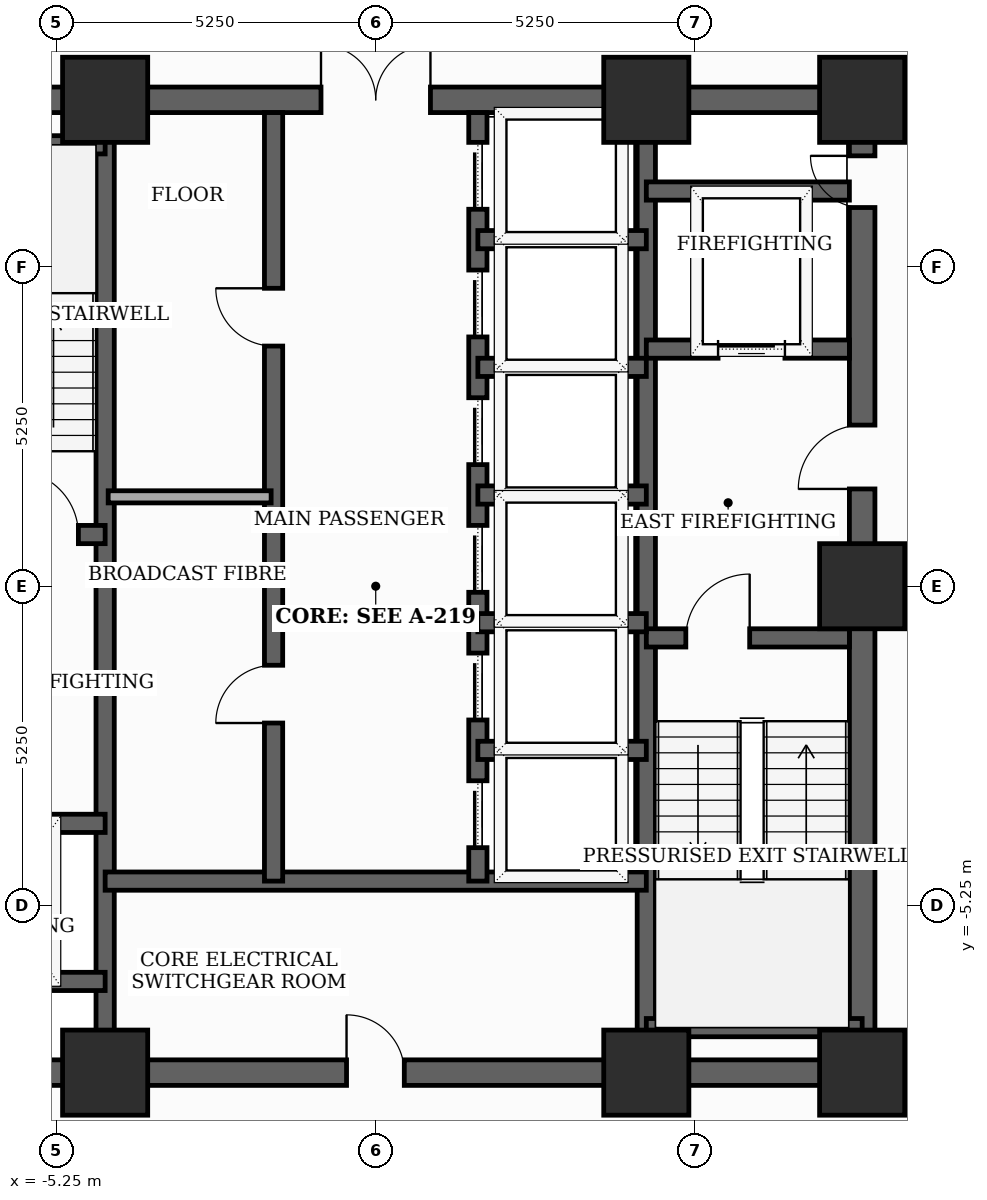
"""IFC4 building model, lengths in metres.
Left out: names, types, materials, properties, quantities, classifications, styles, units other than length and angle.
Written with IfcOpenShell. Run it as: python <this file> out.ifc"""

import sys

from ifc_helpers import new_model, si_unit, direction, frame, frame_2d, origin, origin_2d, place, context, subcontext, project, spatial, rectangle, extrude, element, fill, save


model = new_model("IFC4")
c1 = context("Model", 3, precision=1e-05, world=origin(), true_north=direction((0.0, 1.0)))
c2 = subcontext(c1, "Body", "Model", "MODEL_VIEW")
j1 = project(units=[si_unit("LENGTHUNIT", "METRE"), si_unit("PLANEANGLEUNIT", "RADIAN")], contexts=[c1])
p1 = place(None, origin())
s1 = spatial("IfcSite", under=j1, at=p1, CompositionType="ELEMENT")
p2 = place(p1, origin())
s2 = spatial("IfcBuilding", under=s1, at=p2, CompositionType="ELEMENT")
p3 = place(p2, frame((0.0, 0.0, 158.3)))
s3 = spatial("IfcBuildingStorey", under=s2, at=p3, CompositionType="ELEMENT", Elevation=158.3)
for number, where, z_axis, x_axis in (
    (1, (-4.45, -8.0, 0.0), (0.0, 0.0, 1.0), (1.0, 0.0, 0.0)),
    (2, (4.45, -8.0, 0.0), (0.0, 0.0, 1.0), (1.0, 0.0, 0.0)),
    (3, (8.0, -8.0, 0.0), (0.0, 0.0, 1.0), (1.0, 0.0, 0.0)),
    (4, (8.0, 0.0, 0.0), (0.0, 0.0, 1.0), (1.0, 0.0, 0.0)),
    (5, (8.0, 8.0, 0.0), (0.0, 0.0, 1.0), (1.0, 0.0, 0.0)),
    (6, (4.45, 8.0, 0.0), (0.0, 0.0, 1.0), (1.0, 0.0, 0.0)),
    (7, (-4.45, 8.0, 0.0), (0.0, 0.0, 1.0), (1.0, 0.0, 0.0)),
):
    element("IfcColumn", number, at=place(p3, frame(where, z_axis=z_axis, x_axis=x_axis)), inside=s3, PredefinedType="COLUMN", context=c2, shape_type="SweptSolid", body=[
        extrude(rectangle(XDim=1.4, YDim=1.4, at=origin_2d()), origin(), (0.0, 0.0, 1.0), 3.7),
    ])
p4 = place(p3, frame((6.493, -14.041, 0.0), z_axis=(0.0, 0.0, 1.0), x_axis=(0.80901166244, 0.587792591002, 0.0)))
e8 = element("IfcWall", 8, at=p4, inside=s3, PredefinedType="SOLIDWALL", context=c2, shape_type="SweptSolid", body=[
    extrude(rectangle(XDim=10.8, YDim=0.26, at=frame_2d((5.4, 0.0))), origin(), (0.0, 0.0, 1.0), 3.5),
])
p5 = place(p4, frame((1.6, 0.0, 0.0)))
e9 = element("IfcOpeningElement", 9, at=p5, cuts=e8, PredefinedType="OPENING", context=c2, shape_type="SweptSolid", body=[
    extrude(rectangle(XDim=1.6, YDim=2.08, at=frame_2d((0.8, 1.04))), frame((0.0, 0.14, 0.0), z_axis=(0.0, -1.0, 0.0), x_axis=(1.0, 0.0, 0.0)), (0.0, 0.0, 1.0), 0.28),
])
p6 = place(p4, frame((5.65, 0.0, 0.85)))
e10 = element("IfcOpeningElement", 10, at=p6, cuts=e8, PredefinedType="OPENING", context=c2, shape_type="SweptSolid", body=[
    extrude(rectangle(XDim=1.3, YDim=1.25, at=frame_2d((0.65, 0.625))), frame((0.0, 0.14, 0.0), z_axis=(0.0, -1.0, 0.0), x_axis=(1.0, 0.0, 0.0)), (0.0, 0.0, 1.0), 0.28),
])
p7 = place(p3, frame((8.0, -8.0, 0.0), z_axis=(0.0, 0.0, 1.0), x_axis=(0.0, 1.0, 0.0)))
e11 = element("IfcWall", 11, at=p7, inside=s3, PredefinedType="SHEAR", context=c2, shape_type="SweptSolid", body=[
    extrude(rectangle(XDim=16.0, YDim=0.42, at=frame_2d((8.0, 0.0))), origin(), (0.0, 0.0, 1.0), 3.5),
])
p8 = place(p7, frame((9.6, 0.0, 0.0)))
e12 = element("IfcOpeningElement", 12, at=p8, cuts=e11, PredefinedType="OPENING", context=c2, shape_type="SweptSolid", body=[
    extrude(rectangle(XDim=1.05, YDim=2.15, at=frame_2d((0.525, 1.075))), frame((0.0, 0.22, 0.0), z_axis=(0.0, -1.0, 0.0), x_axis=(1.0, 0.0, 0.0)), (0.0, 0.0, 1.0), 0.44),
])
p9 = place(p7, frame((14.229, 0.0, 0.0)))
e13 = element("IfcOpeningElement", 13, at=p9, cuts=e11, PredefinedType="OPENING", context=c2, shape_type="SweptSolid", body=[
    extrude(rectangle(XDim=0.85, YDim=2.02, at=frame_2d((0.425, 1.01))), frame((0.0, 0.22, 0.0), z_axis=(0.0, -1.0, 0.0), x_axis=(1.0, 0.0, 0.0)), (0.0, 0.0, 1.0), 0.44),
])
p10 = place(p3, frame((-8.0, -8.0, 0.0), z_axis=(0.0, 0.0, 1.0), x_axis=(1.0, 0.0, 0.0)))
e14 = element("IfcWall", 14, at=p10, inside=s3, PredefinedType="SHEAR", context=c2, shape_type="SweptSolid", body=[
    extrude(rectangle(XDim=16.0, YDim=0.42, at=frame_2d((8.0, 0.0))), origin(), (0.0, 0.0, 1.0), 3.5),
])
p11 = place(p10, frame((7.52, 0.0, 0.0)))
e15 = element("IfcOpeningElement", 15, at=p11, cuts=e14, PredefinedType="OPENING", context=c2, shape_type="SweptSolid", body=[
    extrude(rectangle(XDim=0.95, YDim=2.1, at=frame_2d((0.475, 1.05))), frame((0.0, 0.22, 0.0), z_axis=(0.0, -1.0, 0.0), x_axis=(1.0, 0.0, 0.0)), (0.0, 0.0, 1.0), 0.44),
])
p12 = place(p3, frame((-8.0, 8.0, 0.0), z_axis=(0.0, 0.0, 1.0), x_axis=(1.0, 0.0, 0.0)))
e16 = element("IfcWall", 16, at=p12, inside=s3, PredefinedType="SHEAR", context=c2, shape_type="SweptSolid", body=[
    extrude(rectangle(XDim=16.0, YDim=0.42, at=frame_2d((8.0, 0.0))), origin(), (0.0, 0.0, 1.0), 3.5),
])
p13 = place(p12, frame((7.1, 0.0, 0.0)))
e17 = element("IfcOpeningElement", 17, at=p13, cuts=e16, PredefinedType="OPENING", context=c2, shape_type="SweptSolid", body=[
    extrude(rectangle(XDim=1.8, YDim=2.15, at=frame_2d((0.9, 1.075))), frame((0.0, 0.22, 0.0), z_axis=(0.0, -1.0, 0.0), x_axis=(1.0, 0.0, 0.0)), (0.0, 0.0, 1.0), 0.44),
])
for number, where, z_axis, x_axis in (
    (18, (-4.45, -7.79, 0.0), (0.0, 0.0, 1.0), (0.0, 1.0, 0.0)),
    (19, (4.45, -7.79, 0.0), (0.0, 0.0, 1.0), (0.0, 1.0, 0.0)),
):
    element("IfcWall", number, at=place(p3, frame(where, z_axis=z_axis, x_axis=x_axis)), inside=s3, PredefinedType="SHEAR", context=c2, shape_type="SweptSolid", body=[
        extrude(rectangle(XDim=15.58, YDim=0.3, at=frame_2d((7.79, 0.0))), origin(), (0.0, 0.0, 1.0), 3.5),
    ])
p14 = place(p3, frame((-7.79, 0.85, 0.0), z_axis=(0.0, 0.0, 1.0), x_axis=(1.0, 0.0, 0.0)))
e20 = element("IfcWall", 20, at=p14, inside=s3, PredefinedType="SHEAR", context=c2, shape_type="SweptSolid", body=[
    extrude(rectangle(XDim=3.34, YDim=0.3, at=frame_2d((1.67, 0.0))), origin(), (0.0, 0.0, 1.0), 3.5),
])
p15 = place(p14, frame((1.85, 0.0, 0.0)))
e21 = element("IfcOpeningElement", 21, at=p15, cuts=e20, PredefinedType="OPENING", context=c2, shape_type="SweptSolid", body=[
    extrude(rectangle(XDim=1.05, YDim=2.15, at=frame_2d((0.525, 1.075))), frame((0.0, 0.16, 0.0), z_axis=(0.0, -1.0, 0.0), x_axis=(1.0, 0.0, 0.0)), (0.0, 0.0, 1.0), 0.32),
])
p16 = place(p3, frame((-7.79, 7.26, 0.0), z_axis=(0.0, 0.0, 1.0), x_axis=(1.0, 0.0, 0.0)))
e22 = element("IfcWall", 22, at=p16, inside=s3, PredefinedType="SHEAR", context=c2, shape_type="SweptSolid", body=[
    extrude(rectangle(XDim=3.34, YDim=0.3, at=frame_2d((1.67, 0.0))), origin(), (0.0, 0.0, 1.0), 3.5),
])
p17 = place(p3, frame((4.45, -0.85, 0.0), z_axis=(0.0, 0.0, 1.0), x_axis=(1.0, 0.0, 0.0)))
e23 = element("IfcWall", 23, at=p17, inside=s3, PredefinedType="SHEAR", context=c2, shape_type="SweptSolid", body=[
    extrude(rectangle(XDim=3.34, YDim=0.3, at=frame_2d((1.67, 0.0))), origin(), (0.0, 0.0, 1.0), 3.5),
])
p18 = place(p17, frame((0.65, 0.0, 0.0)))
e24 = element("IfcOpeningElement", 24, at=p18, cuts=e23, PredefinedType="OPENING", context=c2, shape_type="SweptSolid", body=[
    extrude(rectangle(XDim=1.05, YDim=2.15, at=frame_2d((0.525, 1.075))), frame((0.0, 0.16, 0.0), z_axis=(0.0, -1.0, 0.0), x_axis=(1.0, 0.0, 0.0)), (0.0, 0.0, 1.0), 0.32),
])
p19 = place(p3, frame((4.45, -7.26, 0.0), z_axis=(0.0, 0.0, 1.0), x_axis=(1.0, 0.0, 0.0)))
e25 = element("IfcWall", 25, at=p19, inside=s3, PredefinedType="SHEAR", context=c2, shape_type="SweptSolid", body=[
    extrude(rectangle(XDim=3.55, YDim=0.3, at=frame_2d((1.775, 0.0))), origin(), (0.0, 0.0, 1.0), 3.5),
])
p20 = place(p3, frame((-7.79, -3.9, 0.0), z_axis=(0.0, 0.0, 1.0), x_axis=(1.0, 0.0, 0.0)))
e26 = element("IfcWall", 26, at=p20, inside=s3, PredefinedType="SHEAR", context=c2, shape_type="SweptSolid", body=[
    extrude(rectangle(XDim=3.34, YDim=0.3, at=frame_2d((1.67, 0.0))), origin(), (0.0, 0.0, 1.0), 3.5),
])
p21 = place(p20, frame((1.27, 0.0, 0.0)))
e27 = element("IfcOpeningElement", 27, at=p21, cuts=e26, PredefinedType="OPENING", context=c2, shape_type="SweptSolid", body=[
    extrude(rectangle(XDim=1.1, YDim=2.1, at=frame_2d((0.55, 1.05))), frame((0.0, 0.16, 0.0), z_axis=(0.0, -1.0, 0.0), x_axis=(1.0, 0.0, 0.0)), (0.0, 0.0, 1.0), 0.32),
])
p22 = place(p3, frame((-7.79, -6.5, 0.0), z_axis=(0.0, 0.0, 1.0), x_axis=(1.0, 0.0, 0.0)))
e28 = element("IfcWall", 28, at=p22, inside=s3, PredefinedType="SHEAR", context=c2, shape_type="SweptSolid", body=[
    extrude(rectangle(XDim=3.34, YDim=0.3, at=frame_2d((1.67, 0.0))), origin(), (0.0, 0.0, 1.0), 3.5),
])
p23 = place(p3, frame((4.45, 3.9, 0.0), z_axis=(0.0, 0.0, 1.0), x_axis=(1.0, 0.0, 0.0)))
e29 = element("IfcWall", 29, at=p23, inside=s3, PredefinedType="SHEAR", context=c2, shape_type="SweptSolid", body=[
    extrude(rectangle(XDim=3.34, YDim=0.3, at=frame_2d((1.67, 0.0))), origin(), (0.0, 0.0, 1.0), 3.5),
])
p24 = place(p23, frame((1.18, 0.0, 0.0)))
e30 = element("IfcOpeningElement", 30, at=p24, cuts=e29, PredefinedType="OPENING", context=c2, shape_type="SweptSolid", body=[
    extrude(rectangle(XDim=1.1, YDim=2.1, at=frame_2d((0.55, 1.05))), frame((0.0, 0.16, 0.0), z_axis=(0.0, -1.0, 0.0), x_axis=(1.0, 0.0, 0.0)), (0.0, 0.0, 1.0), 0.32),
])
p25 = place(p3, frame((4.45, 6.5, 0.0), z_axis=(0.0, 0.0, 1.0), x_axis=(1.0, 0.0, 0.0)))
e31 = element("IfcWall", 31, at=p25, inside=s3, PredefinedType="SHEAR", context=c2, shape_type="SweptSolid", body=[
    extrude(rectangle(XDim=3.34, YDim=0.3, at=frame_2d((1.67, 0.0))), origin(), (0.0, 0.0, 1.0), 3.5),
])
p26 = place(p3, frame((-4.45, -4.85, 0.0), z_axis=(0.0, 0.0, 1.0), x_axis=(1.0, 0.0, 0.0)))
e32 = element("IfcWall", 32, at=p26, inside=s3, PredefinedType="SHEAR", context=c2, shape_type="SweptSolid", body=[
    extrude(rectangle(XDim=8.9, YDim=0.3, at=frame_2d((4.45, 0.0))), origin(), (0.0, 0.0, 1.0), 3.5),
])
p27 = place(p3, frame((-1.68, -4.85, 0.0), z_axis=(0.0, 0.0, 1.0), x_axis=(0.0, 1.0, 0.0)))
e33 = element("IfcWall", 33, at=p27, inside=s3, PredefinedType="SHEAR", context=c2, shape_type="SweptSolid", body=[
    extrude(rectangle(XDim=12.64, YDim=0.3, at=frame_2d((6.32, 0.0))), origin(), (0.0, 0.0, 1.0), 3.5),
])
p28 = place(p27, frame((2.6, 0.0, 0.0)))
e34 = element("IfcOpeningElement", 34, at=p28, cuts=e33, PredefinedType="OPENING", context=c2, shape_type="SweptSolid", body=[
    extrude(rectangle(XDim=0.95, YDim=2.1, at=frame_2d((0.475, 1.05))), frame((0.0, 0.16, 0.0), z_axis=(0.0, -1.0, 0.0), x_axis=(1.0, 0.0, 0.0)), (0.0, 0.0, 1.0), 0.32),
])
p29 = place(p27, frame((8.8, 0.0, 0.0)))
e35 = element("IfcOpeningElement", 35, at=p29, cuts=e33, PredefinedType="OPENING", context=c2, shape_type="SweptSolid", body=[
    extrude(rectangle(XDim=0.95, YDim=2.1, at=frame_2d((0.475, 1.05))), frame((0.0, 0.16, 0.0), z_axis=(0.0, -1.0, 0.0), x_axis=(1.0, 0.0, 0.0)), (0.0, 0.0, 1.0), 0.32),
])
p30 = place(p3, frame((1.68, -4.85, 0.0), z_axis=(0.0, 0.0, 1.0), x_axis=(0.0, 1.0, 0.0)))
e36 = element("IfcWall", 36, at=p30, inside=s3, PredefinedType="SHEAR", context=c2, shape_type="SweptSolid", body=[
    extrude(rectangle(XDim=12.64, YDim=0.3, at=frame_2d((6.32, 0.0))), origin(), (0.0, 0.0, 1.0), 3.5),
])
p31 = place(p30, frame((0.55, 0.0, 0.0)))
e37 = element("IfcOpeningElement", 37, at=p31, cuts=e36, PredefinedType="OPENING", context=c2, shape_type="SweptSolid", body=[
    extrude(rectangle(XDim=1.1, YDim=2.1, at=frame_2d((0.55, 1.05))), frame((0.0, 0.16, 0.0), z_axis=(0.0, -1.0, 0.0), x_axis=(1.0, 0.0, 0.0)), (0.0, 0.0, 1.0), 0.32),
])
p32 = place(p30, frame((2.65, 0.0, 0.0)))
e38 = element("IfcOpeningElement", 38, at=p32, cuts=e36, PredefinedType="OPENING", context=c2, shape_type="SweptSolid", body=[
    extrude(rectangle(XDim=1.1, YDim=2.1, at=frame_2d((0.55, 1.05))), frame((0.0, 0.16, 0.0), z_axis=(0.0, -1.0, 0.0), x_axis=(1.0, 0.0, 0.0)), (0.0, 0.0, 1.0), 0.32),
])
p33 = place(p30, frame((4.75, 0.0, 0.0)))
e39 = element("IfcOpeningElement", 39, at=p33, cuts=e36, PredefinedType="OPENING", context=c2, shape_type="SweptSolid", body=[
    extrude(rectangle(XDim=1.1, YDim=2.1, at=frame_2d((0.55, 1.05))), frame((0.0, 0.16, 0.0), z_axis=(0.0, -1.0, 0.0), x_axis=(1.0, 0.0, 0.0)), (0.0, 0.0, 1.0), 0.32),
])
p34 = place(p30, frame((6.85, 0.0, 0.0)))
e40 = element("IfcOpeningElement", 40, at=p34, cuts=e36, PredefinedType="OPENING", context=c2, shape_type="SweptSolid", body=[
    extrude(rectangle(XDim=1.1, YDim=2.1, at=frame_2d((0.55, 1.05))), frame((0.0, 0.16, 0.0), z_axis=(0.0, -1.0, 0.0), x_axis=(1.0, 0.0, 0.0)), (0.0, 0.0, 1.0), 0.32),
])
p35 = place(p30, frame((8.95, 0.0, 0.0)))
e41 = element("IfcOpeningElement", 41, at=p35, cuts=e36, PredefinedType="OPENING", context=c2, shape_type="SweptSolid", body=[
    extrude(rectangle(XDim=1.1, YDim=2.1, at=frame_2d((0.55, 1.05))), frame((0.0, 0.16, 0.0), z_axis=(0.0, -1.0, 0.0), x_axis=(1.0, 0.0, 0.0)), (0.0, 0.0, 1.0), 0.32),
])
p36 = place(p30, frame((11.05, 0.0, 0.0)))
e42 = element("IfcOpeningElement", 42, at=p36, cuts=e36, PredefinedType="OPENING", context=c2, shape_type="SweptSolid", body=[
    extrude(rectangle(XDim=1.1, YDim=2.1, at=frame_2d((0.55, 1.05))), frame((0.0, 0.16, 0.0), z_axis=(0.0, -1.0, 0.0), x_axis=(1.0, 0.0, 0.0)), (0.0, 0.0, 1.0), 0.32),
])
for number, where, z_axis, x_axis in (
    (43, (1.68, 1.5, 0.0), (0.0, 0.0, 1.0), (1.0, 0.0, 0.0)),
    (44, (1.68, 3.6, 0.0), (0.0, 0.0, 1.0), (1.0, 0.0, 0.0)),
    (45, (1.68, 5.7, 0.0), (0.0, 0.0, 1.0), (1.0, 0.0, 0.0)),
    (46, (1.68, -2.7, 0.0), (0.0, 0.0, 1.0), (1.0, 0.0, 0.0)),
    (47, (1.68, -0.6, 0.0), (0.0, 0.0, 1.0), (1.0, 0.0, 0.0)),
):
    element("IfcWall", number, at=place(p3, frame(where, z_axis=z_axis, x_axis=x_axis)), inside=s3, PredefinedType="SHEAR", context=c2, shape_type="SweptSolid", body=[
        extrude(rectangle(XDim=2.77, YDim=0.3, at=frame_2d((1.385, 0.0))), origin(), (0.0, 0.0, 1.0), 3.5),
    ])
p37 = place(p3, frame((-4.4, 1.47, 0.0), z_axis=(0.0, 0.0, 1.0), x_axis=(1.0, 0.0, 0.0)))
e48 = element("IfcWall", 48, at=p37, inside=s3, PredefinedType="SOLIDWALL", context=c2, shape_type="SweptSolid", body=[
    extrude(rectangle(XDim=2.68, YDim=0.2, at=frame_2d((1.34, 0.0))), origin(), (0.0, 0.0, 1.0), 3.5),
])
p38 = place(p8, origin())
e49 = element("IfcDoor", 49, at=p38, inside=s3, OperationType="SINGLE_SWING_LEFT", PredefinedType="DOOR", context=c2, shape_type="SweptSolid", body=[
    extrude(rectangle(XDim=1.05, YDim=2.15, at=frame_2d((0.525, 1.075))), frame((0.0, 0.025, 0.0), z_axis=(0.0, -1.0, 0.0), x_axis=(1.0, 0.0, 0.0)), (0.0, 0.0, 1.0), 0.05),
])
fill(e12, e49)
p39 = place(p9, origin())
e50 = element("IfcDoor", 50, at=p39, inside=s3, OperationType="SINGLE_SWING_RIGHT", PredefinedType="TRAPDOOR", context=c2, shape_type="SweptSolid", body=[
    extrude(rectangle(XDim=0.85, YDim=2.02, at=frame_2d((0.425, 1.01))), frame((0.0, 0.025, 0.0), z_axis=(0.0, -1.0, 0.0), x_axis=(1.0, 0.0, 0.0)), (0.0, 0.0, 1.0), 0.05),
])
fill(e13, e50)
p40 = place(p11, origin())
e51 = element("IfcDoor", 51, at=p40, inside=s3, OperationType="SINGLE_SWING_LEFT", PredefinedType="DOOR", context=c2, shape_type="SweptSolid", body=[
    extrude(rectangle(XDim=0.95, YDim=2.1, at=frame_2d((0.475, 1.05))), frame((0.0, 0.025, 0.0), z_axis=(0.0, -1.0, 0.0), x_axis=(1.0, 0.0, 0.0)), (0.0, 0.0, 1.0), 0.05),
])
fill(e15, e51)
p41 = place(p13, origin())
e52 = element("IfcDoor", 52, at=p41, inside=s3, OperationType="DOUBLE_DOOR_SINGLE_SWING", PredefinedType="DOOR", context=c2, shape_type="SweptSolid", body=[
    extrude(rectangle(XDim=1.8, YDim=2.15, at=frame_2d((0.9, 1.075))), frame((0.0, 0.025, 0.0), z_axis=(0.0, -1.0, 0.0), x_axis=(1.0, 0.0, 0.0)), (0.0, 0.0, 1.0), 0.05),
])
fill(e17, e52)
p42 = place(p15, origin())
e53 = element("IfcDoor", 53, at=p42, inside=s3, OperationType="SINGLE_SWING_LEFT", PredefinedType="DOOR", context=c2, shape_type="SweptSolid", body=[
    extrude(rectangle(XDim=1.05, YDim=2.15, at=frame_2d((0.525, 1.075))), frame((0.0, 0.025, 0.0), z_axis=(0.0, -1.0, 0.0), x_axis=(1.0, 0.0, 0.0)), (0.0, 0.0, 1.0), 0.05),
])
fill(e21, e53)
p43 = place(p18, origin())
e54 = element("IfcDoor", 54, at=p43, inside=s3, OperationType="SINGLE_SWING_RIGHT", PredefinedType="DOOR", context=c2, shape_type="SweptSolid", body=[
    extrude(rectangle(XDim=1.05, YDim=2.15, at=frame_2d((0.525, 1.075))), frame((0.0, 0.025, 0.0), z_axis=(0.0, -1.0, 0.0), x_axis=(1.0, 0.0, 0.0)), (0.0, 0.0, 1.0), 0.05),
])
fill(e24, e54)
p44 = place(p24, origin())
e55 = element("IfcDoor", 55, at=p44, inside=s3, OperationType="SLIDING_TO_LEFT", PredefinedType="DOOR", context=c2, shape_type="SweptSolid", body=[
    extrude(rectangle(XDim=1.1, YDim=2.1, at=frame_2d((0.55, 1.05))), frame((0.0, 0.025, 0.0), z_axis=(0.0, -1.0, 0.0), x_axis=(1.0, 0.0, 0.0)), (0.0, 0.0, 1.0), 0.05),
])
fill(e30, e55)
p45 = place(p28, origin())
e56 = element("IfcDoor", 56, at=p45, inside=s3, OperationType="SINGLE_SWING_LEFT", PredefinedType="DOOR", context=c2, shape_type="SweptSolid", body=[
    extrude(rectangle(XDim=0.95, YDim=2.1, at=frame_2d((0.475, 1.05))), frame((0.0, 0.025, 0.0), z_axis=(0.0, -1.0, 0.0), x_axis=(1.0, 0.0, 0.0)), (0.0, 0.0, 1.0), 0.05),
])
fill(e34, e56)
p46 = place(p29, origin())
e57 = element("IfcDoor", 57, at=p46, inside=s3, OperationType="SINGLE_SWING_RIGHT", PredefinedType="DOOR", context=c2, shape_type="SweptSolid", body=[
    extrude(rectangle(XDim=0.95, YDim=2.1, at=frame_2d((0.475, 1.05))), frame((0.0, 0.025, 0.0), z_axis=(0.0, -1.0, 0.0), x_axis=(1.0, 0.0, 0.0)), (0.0, 0.0, 1.0), 0.05),
])
fill(e35, e57)
p47 = place(p31, origin())
e58 = element("IfcDoor", 58, at=p47, inside=s3, OperationType="SLIDING_TO_LEFT", PredefinedType="DOOR", context=c2, shape_type="SweptSolid", body=[
    extrude(rectangle(XDim=1.1, YDim=2.1, at=frame_2d((0.55, 1.05))), frame((0.0, 0.025, 0.0), z_axis=(0.0, -1.0, 0.0), x_axis=(1.0, 0.0, 0.0)), (0.0, 0.0, 1.0), 0.05),
])
fill(e37, e58)
p48 = place(p32, origin())
e59 = element("IfcDoor", 59, at=p48, inside=s3, OperationType="SLIDING_TO_LEFT", PredefinedType="DOOR", context=c2, shape_type="SweptSolid", body=[
    extrude(rectangle(XDim=1.1, YDim=2.1, at=frame_2d((0.55, 1.05))), frame((0.0, 0.025, 0.0), z_axis=(0.0, -1.0, 0.0), x_axis=(1.0, 0.0, 0.0)), (0.0, 0.0, 1.0), 0.05),
])
fill(e38, e59)
p49 = place(p33, origin())
e60 = element("IfcDoor", 60, at=p49, inside=s3, OperationType="SLIDING_TO_LEFT", PredefinedType="DOOR", context=c2, shape_type="SweptSolid", body=[
    extrude(rectangle(XDim=1.1, YDim=2.1, at=frame_2d((0.55, 1.05))), frame((0.0, 0.025, 0.0), z_axis=(0.0, -1.0, 0.0), x_axis=(1.0, 0.0, 0.0)), (0.0, 0.0, 1.0), 0.05),
])
fill(e39, e60)
p50 = place(p34, origin())
e61 = element("IfcDoor", 61, at=p50, inside=s3, OperationType="SLIDING_TO_LEFT", PredefinedType="DOOR", context=c2, shape_type="SweptSolid", body=[
    extrude(rectangle(XDim=1.1, YDim=2.1, at=frame_2d((0.55, 1.05))), frame((0.0, 0.025, 0.0), z_axis=(0.0, -1.0, 0.0), x_axis=(1.0, 0.0, 0.0)), (0.0, 0.0, 1.0), 0.05),
])
fill(e40, e61)
p51 = place(p35, origin())
e62 = element("IfcDoor", 62, at=p51, inside=s3, OperationType="SLIDING_TO_LEFT", PredefinedType="DOOR", context=c2, shape_type="SweptSolid", body=[
    extrude(rectangle(XDim=1.1, YDim=2.1, at=frame_2d((0.55, 1.05))), frame((0.0, 0.025, 0.0), z_axis=(0.0, -1.0, 0.0), x_axis=(1.0, 0.0, 0.0)), (0.0, 0.0, 1.0), 0.05),
])
fill(e41, e62)
p52 = place(p36, origin())
e63 = element("IfcDoor", 63, at=p52, inside=s3, OperationType="SLIDING_TO_LEFT", PredefinedType="DOOR", context=c2, shape_type="SweptSolid", body=[
    extrude(rectangle(XDim=1.1, YDim=2.1, at=frame_2d((0.55, 1.05))), frame((0.0, 0.025, 0.0), z_axis=(0.0, -1.0, 0.0), x_axis=(1.0, 0.0, 0.0)), (0.0, 0.0, 1.0), 0.05),
])
fill(e42, e63)
save(model, sys.argv[1])
